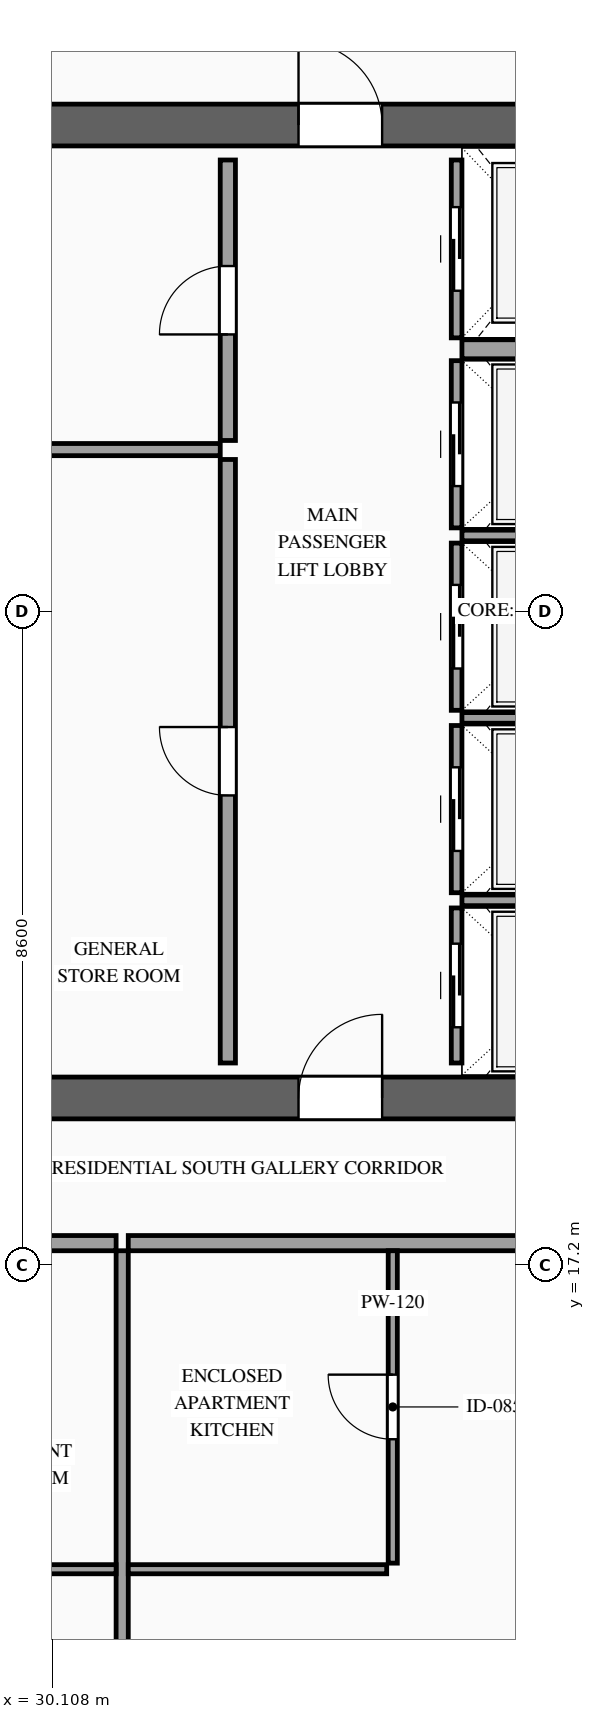
"""IFC4 building model, lengths in metres.
Left out: names, types, materials, properties, quantities, classifications, styles, units other than length and angle.
Written with IfcOpenShell. Run it as: python <this file> out.ifc"""

import sys

from ifc_helpers import new_model, si_unit, direction, frame, frame_2d, origin, place, context, subcontext, project, spatial, rectangle, extrude, source, transform, mapped, element, fill, save


model = new_model("IFC4")
c1 = context("Model", 3, precision=1e-05, world=origin(), true_north=direction((0.0, 1.0)))
c2 = subcontext(c1, "Body", "Model", "MODEL_VIEW")
j1 = project(units=[si_unit("LENGTHUNIT", "METRE"), si_unit("PLANEANGLEUNIT", "RADIAN")], contexts=[c1])
p1 = place(None, origin())
s1 = spatial("IfcSite", under=j1, at=p1, CompositionType="ELEMENT")
p2 = place(p1, origin())
s2 = spatial("IfcBuilding", under=s1, at=p2, CompositionType="ELEMENT")
p3 = place(p2, frame((0.0, 0.0, 241.6)))
s3 = spatial("IfcBuildingStorey", under=s2, at=p3, CompositionType="ELEMENT", Elevation=241.6)
p4 = place(p3, frame((23.525, 19.4, 0.0), z_axis=(0.0, 0.0, 1.0), x_axis=(1.0, 0.0, 0.0)))
e1 = element("IfcWall", 1, at=p4, inside=s3, PredefinedType="SHEAR", context=c2, shape_type="SweptSolid", body=[
    extrude(rectangle(XDim=26.95, YDim=0.55, at=frame_2d((13.475, 0.0))), origin(), (0.0, 0.0, 1.0), 3.5),
])
p5 = place(p4, frame((1.925, 0.0, 0.0)))
e2 = element("IfcOpeningElement", 2, at=p5, cuts=e1, PredefinedType="OPENING", context=c2, shape_type="SweptSolid", body=[
    extrude(rectangle(XDim=1.1, YDim=2.2, at=frame_2d((0.55, 1.1))), frame((0.0, 0.29, 0.0), z_axis=(0.0, -1.0, 0.0), x_axis=(1.0, 0.0, 0.0)), (0.0, 0.0, 1.0), 0.58),
])
p6 = place(p4, frame((9.825, 0.0, 0.0)))
e3 = element("IfcOpeningElement", 3, at=p6, cuts=e1, PredefinedType="OPENING", context=c2, shape_type="SweptSolid", body=[
    extrude(rectangle(XDim=1.1, YDim=2.2, at=frame_2d((0.55, 1.1))), frame((0.0, 0.29, 0.0), z_axis=(0.0, -1.0, 0.0), x_axis=(1.0, 0.0, 0.0)), (0.0, 0.0, 1.0), 0.58),
])
p7 = place(p4, frame((23.025, 0.0, 0.0)))
e4 = element("IfcOpeningElement", 4, at=p7, cuts=e1, PredefinedType="OPENING", context=c2, shape_type="SweptSolid", body=[
    extrude(rectangle(XDim=1.1, YDim=2.2, at=frame_2d((0.55, 1.1))), frame((0.0, 0.29, 0.0), z_axis=(0.0, -1.0, 0.0), x_axis=(1.0, 0.0, 0.0)), (0.0, 0.0, 1.0), 0.58),
])
p8 = place(p4, frame((19.645, 0.0, 0.0)))
e5 = element("IfcOpeningElement", 5, at=p8, cuts=e1, PredefinedType="OPENING", context=c2, shape_type="SweptSolid", body=[
    extrude(rectangle(XDim=0.9, YDim=2.15, at=frame_2d((0.45, 1.075))), frame((0.0, 0.29, 0.0), z_axis=(0.0, -1.0, 0.0), x_axis=(1.0, 0.0, 0.0)), (0.0, 0.0, 1.0), 0.58),
])
p9 = place(p4, frame((18.205, 0.0, 0.0)))
e6 = element("IfcOpeningElement", 6, at=p9, cuts=e1, PredefinedType="OPENING", context=c2, shape_type="SweptSolid", body=[
    extrude(rectangle(XDim=0.9, YDim=2.15, at=frame_2d((0.45, 1.075))), frame((0.0, 0.29, 0.0), z_axis=(0.0, -1.0, 0.0), x_axis=(1.0, 0.0, 0.0)), (0.0, 0.0, 1.0), 0.58),
])
p10 = place(p3, frame((23.525, 32.2, 0.0), z_axis=(0.0, 0.0, 1.0), x_axis=(1.0, 0.0, 0.0)))
e7 = element("IfcWall", 7, at=p10, inside=s3, PredefinedType="SHEAR", context=c2, shape_type="SweptSolid", body=[
    extrude(rectangle(XDim=26.95, YDim=0.55, at=frame_2d((13.475, 0.0))), origin(), (0.0, 0.0, 1.0), 3.5),
])
p11 = place(p10, frame((4.545, 0.0, 0.0)))
e8 = element("IfcOpeningElement", 8, at=p11, cuts=e7, PredefinedType="OPENING", context=c2, shape_type="SweptSolid", body=[
    extrude(rectangle(XDim=0.9, YDim=2.15, at=frame_2d((0.45, 1.075))), frame((0.0, 0.29, 0.0), z_axis=(0.0, -1.0, 0.0), x_axis=(1.0, 0.0, 0.0)), (0.0, 0.0, 1.0), 0.58),
])
p12 = place(p10, frame((9.825, 0.0, 0.0)))
e9 = element("IfcOpeningElement", 9, at=p12, cuts=e7, PredefinedType="OPENING", context=c2, shape_type="SweptSolid", body=[
    extrude(rectangle(XDim=1.1, YDim=2.2, at=frame_2d((0.55, 1.1))), frame((0.0, 0.29, 0.0), z_axis=(0.0, -1.0, 0.0), x_axis=(1.0, 0.0, 0.0)), (0.0, 0.0, 1.0), 0.58),
])
p13 = place(p10, frame((15.675, 0.0, 0.0)))
e10 = element("IfcOpeningElement", 10, at=p13, cuts=e7, PredefinedType="OPENING", context=c2, shape_type="SweptSolid", body=[
    extrude(rectangle(XDim=1.1, YDim=2.2, at=frame_2d((0.55, 1.1))), frame((0.0, 0.29, 0.0), z_axis=(0.0, -1.0, 0.0), x_axis=(1.0, 0.0, 0.0)), (0.0, 0.0, 1.0), 0.58),
])
p14 = place(p10, frame((18.205, 0.0, 0.0)))
e11 = element("IfcOpeningElement", 11, at=p14, cuts=e7, PredefinedType="OPENING", context=c2, shape_type="SweptSolid", body=[
    extrude(rectangle(XDim=0.9, YDim=2.15, at=frame_2d((0.45, 1.075))), frame((0.0, 0.29, 0.0), z_axis=(0.0, -1.0, 0.0), x_axis=(1.0, 0.0, 0.0)), (0.0, 0.0, 1.0), 0.58),
])
p15 = place(p10, frame((19.645, 0.0, 0.0)))
e12 = element("IfcOpeningElement", 12, at=p15, cuts=e7, PredefinedType="OPENING", context=c2, shape_type="SweptSolid", body=[
    extrude(rectangle(XDim=0.9, YDim=2.15, at=frame_2d((0.45, 1.075))), frame((0.0, 0.29, 0.0), z_axis=(0.0, -1.0, 0.0), x_axis=(1.0, 0.0, 0.0)), (0.0, 0.0, 1.0), 0.58),
])
p16 = place(p3, frame((35.43, 19.86, 0.0), z_axis=(0.0, 0.0, 1.0), x_axis=(0.0, 1.0, 0.0)))
e13 = element("IfcWall", 13, at=p16, inside=s3, PredefinedType="SOLIDWALL", context=c2, shape_type="SweptSolid", body=[
    extrude(rectangle(XDim=2.04, YDim=0.14, at=frame_2d((1.02, 0.0))), origin(), (0.0, 0.0, 1.0), 3.28),
])
p17 = place(p16, frame((0.47, 0.0, 0.0)))
e14 = element("IfcOpeningElement", 14, at=p17, cuts=e13, PredefinedType="OPENING", context=c2, shape_type="SweptSolid", body=[
    extrude(rectangle(XDim=1.1, YDim=2.2, at=frame_2d((0.55, 1.1))), frame((0.0, 0.085, 0.0), z_axis=(0.0, -1.0, 0.0), x_axis=(1.0, 0.0, 0.0)), (0.0, 0.0, 1.0), 0.17),
])
m1 = source(origin(), c2, "Body", "SweptSolid", [
    extrude(rectangle(XDim=2.4, YDim=0.14, at=frame_2d((1.2, 0.0))), origin(), (0.0, 0.0, 1.0), 3.28),
])
p18 = place(p3, frame((35.5, 22.0, 0.0), z_axis=(0.0, 0.0, 1.0), x_axis=(1.0, 0.0, 0.0)))
e15 = element("IfcWall", 15, at=p18, inside=s3, PredefinedType="SOLIDWALL", context=c2, shape_type="MappedRepresentation", body=[
    mapped(m1, transform((0.0, 0.0, 0.0), scale=1.0)),
])
p19 = place(p3, frame((35.43, 22.1, 0.0), z_axis=(0.0, 0.0, 1.0), x_axis=(0.0, 1.0, 0.0)))
e16 = element("IfcWall", 16, at=p19, inside=s3, PredefinedType="SOLIDWALL", context=c2, shape_type="SweptSolid", body=[
    extrude(rectangle(XDim=2.2, YDim=0.14, at=frame_2d((1.1, 0.0))), origin(), (0.0, 0.0, 1.0), 3.28),
])
p20 = place(p19, frame((0.55, 0.0, 0.0)))
e17 = element("IfcOpeningElement", 17, at=p20, cuts=e16, PredefinedType="OPENING", context=c2, shape_type="SweptSolid", body=[
    extrude(rectangle(XDim=1.1, YDim=2.2, at=frame_2d((0.55, 1.1))), frame((0.0, 0.085, 0.0), z_axis=(0.0, -1.0, 0.0), x_axis=(1.0, 0.0, 0.0)), (0.0, 0.0, 1.0), 0.17),
])
p21 = place(p3, frame((35.5, 24.4, 0.0), z_axis=(0.0, 0.0, 1.0), x_axis=(1.0, 0.0, 0.0)))
e18 = element("IfcWall", 18, at=p21, inside=s3, PredefinedType="SOLIDWALL", context=c2, shape_type="MappedRepresentation", body=[
    mapped(m1, transform((0.0, 0.0, 0.0), scale=1.0)),
])
p22 = place(p3, frame((35.43, 24.5, 0.0), z_axis=(0.0, 0.0, 1.0), x_axis=(0.0, 1.0, 0.0)))
e19 = element("IfcWall", 19, at=p22, inside=s3, PredefinedType="SOLIDWALL", context=c2, shape_type="SweptSolid", body=[
    extrude(rectangle(XDim=2.2, YDim=0.14, at=frame_2d((1.1, 0.0))), origin(), (0.0, 0.0, 1.0), 3.28),
])
p23 = place(p22, frame((0.55, 0.0, 0.0)))
e20 = element("IfcOpeningElement", 20, at=p23, cuts=e19, PredefinedType="OPENING", context=c2, shape_type="SweptSolid", body=[
    extrude(rectangle(XDim=1.1, YDim=2.2, at=frame_2d((0.55, 1.1))), frame((0.0, 0.085, 0.0), z_axis=(0.0, -1.0, 0.0), x_axis=(1.0, 0.0, 0.0)), (0.0, 0.0, 1.0), 0.17),
])
p24 = place(p3, frame((35.5, 26.8, 0.0), z_axis=(0.0, 0.0, 1.0), x_axis=(1.0, 0.0, 0.0)))
e21 = element("IfcWall", 21, at=p24, inside=s3, PredefinedType="SOLIDWALL", context=c2, shape_type="MappedRepresentation", body=[
    mapped(m1, transform((0.0, 0.0, 0.0), scale=1.0)),
])
p25 = place(p3, frame((35.43, 26.9, 0.0), z_axis=(0.0, 0.0, 1.0), x_axis=(0.0, 1.0, 0.0)))
e22 = element("IfcWall", 22, at=p25, inside=s3, PredefinedType="SOLIDWALL", context=c2, shape_type="SweptSolid", body=[
    extrude(rectangle(XDim=2.2, YDim=0.14, at=frame_2d((1.1, 0.0))), origin(), (0.0, 0.0, 1.0), 3.28),
])
p26 = place(p25, frame((0.55, 0.0, 0.0)))
e23 = element("IfcOpeningElement", 23, at=p26, cuts=e22, PredefinedType="OPENING", context=c2, shape_type="SweptSolid", body=[
    extrude(rectangle(XDim=1.1, YDim=2.2, at=frame_2d((0.55, 1.1))), frame((0.0, 0.085, 0.0), z_axis=(0.0, -1.0, 0.0), x_axis=(1.0, 0.0, 0.0)), (0.0, 0.0, 1.0), 0.17),
])
p27 = place(p3, frame((35.43, 29.4, 0.0), z_axis=(0.0, 0.0, 1.0), x_axis=(0.0, 1.0, 0.0)))
e24 = element("IfcWall", 24, at=p27, inside=s3, PredefinedType="SOLIDWALL", context=c2, shape_type="SweptSolid", body=[
    extrude(rectangle(XDim=2.34, YDim=0.14, at=frame_2d((1.17, 0.0))), origin(), (0.0, 0.0, 1.0), 3.28),
])
p28 = place(p27, frame((0.62, 0.0, 0.0)))
e25 = element("IfcOpeningElement", 25, at=p28, cuts=e24, PredefinedType="OPENING", context=c2, shape_type="SweptSolid", body=[
    extrude(rectangle(XDim=1.1, YDim=2.2, at=frame_2d((0.55, 1.1))), frame((0.0, 0.085, 0.0), z_axis=(0.0, -1.0, 0.0), x_axis=(1.0, 0.0, 0.0)), (0.0, 0.0, 1.0), 0.17),
])
m2 = source(origin(), c2, "Body", "SweptSolid", [
    extrude(rectangle(XDim=2.4, YDim=0.25, at=frame_2d((1.2, 0.0))), origin(), (0.0, 0.0, 1.0), 3.28),
])
p29 = place(p3, frame((35.5, 29.25, 0.0), z_axis=(0.0, 0.0, 1.0), x_axis=(1.0, 0.0, 0.0)))
e26 = element("IfcWall", 26, at=p29, inside=s3, PredefinedType="SOLIDWALL", context=c2, shape_type="MappedRepresentation", body=[
    mapped(m2, transform((0.0, 0.0, 0.0), scale=1.0)),
])
p30 = place(p3, frame((32.42, 19.86, 0.0), z_axis=(0.0, 0.0, 1.0), x_axis=(0.0, 1.0, 0.0)))
e27 = element("IfcWall", 27, at=p30, inside=s3, PredefinedType="PARTITIONING", context=c2, shape_type="SweptSolid", body=[
    extrude(rectangle(XDim=7.94, YDim=0.2, at=frame_2d((3.97, 0.0))), origin(), (0.0, 0.0, 1.0), 3.28),
])
p31 = place(p30, frame((3.52, 0.0, 0.0)))
e28 = element("IfcOpeningElement", 28, at=p31, cuts=e27, PredefinedType="OPENING", context=c2, shape_type="SweptSolid", body=[
    extrude(rectangle(XDim=0.9, YDim=2.15, at=frame_2d((0.45, 1.075))), frame((0.0, 0.115, 0.0), z_axis=(0.0, -1.0, 0.0), x_axis=(1.0, 0.0, 0.0)), (0.0, 0.0, 1.0), 0.23),
])
p32 = place(p3, frame((32.42, 28.05, 0.0), z_axis=(0.0, 0.0, 1.0), x_axis=(0.0, 1.0, 0.0)))
e29 = element("IfcWall", 29, at=p32, inside=s3, PredefinedType="PARTITIONING", context=c2, shape_type="SweptSolid", body=[
    extrude(rectangle(XDim=3.69, YDim=0.2, at=frame_2d((1.845, 0.0))), origin(), (0.0, 0.0, 1.0), 3.28),
])
p33 = place(p32, frame((1.395, 0.0, 0.0)))
e30 = element("IfcOpeningElement", 30, at=p33, cuts=e29, PredefinedType="OPENING", context=c2, shape_type="SweptSolid", body=[
    extrude(rectangle(XDim=0.9, YDim=2.15, at=frame_2d((0.45, 1.075))), frame((0.0, 0.115, 0.0), z_axis=(0.0, -1.0, 0.0), x_axis=(1.0, 0.0, 0.0)), (0.0, 0.0, 1.0), 0.23),
])
m3 = source(origin(), c2, "Body", "SweptSolid", [
    extrude(rectangle(XDim=2.47, YDim=0.16, at=frame_2d((1.235, 0.0))), origin(), (0.0, 0.0, 1.0), 3.28),
])
p34 = place(p3, frame((29.85, 27.93, 0.0), z_axis=(0.0, 0.0, 1.0), x_axis=(1.0, 0.0, 0.0)))
e31 = element("IfcWall", 31, at=p34, inside=s3, PredefinedType="PARTITIONING", context=c2, shape_type="MappedRepresentation", body=[
    mapped(m3, transform((0.0, 0.0, 0.0), scale=1.0)),
])
p35 = place(p3, frame((19.44, 17.49, 0.0), z_axis=(0.0, 0.0, 1.0), x_axis=(1.0, 0.0, 0.0)))
e32 = element("IfcWall", 32, at=p35, inside=s3, PredefinedType="PARTITIONING", context=c2, shape_type="SweptSolid", body=[
    extrude(rectangle(XDim=11.51, YDim=0.2, at=frame_2d((5.755, 0.0))), origin(), (0.0, 0.0, 1.0), 3.28),
])
p36 = place(p35, frame((5.355, 0.0, 0.0)))
e33 = element("IfcOpeningElement", 33, at=p36, cuts=e32, PredefinedType="OPENING", context=c2, shape_type="SweptSolid", body=[
    extrude(rectangle(XDim=1.0, YDim=2.2, at=frame_2d((0.5, 1.1))), frame((0.0, 0.115, 0.0), z_axis=(0.0, -1.0, 0.0), x_axis=(1.0, 0.0, 0.0)), (0.0, 0.0, 1.0), 0.23),
])
m4 = source(origin(), c2, "Body", "SweptSolid", [
    extrude(rectangle(XDim=12.04, YDim=0.16, at=frame_2d((6.02, 0.0))), origin(), (0.0, 0.0, 1.0), 3.28),
])
p37 = place(p3, frame((31.03, 5.35, 0.0), z_axis=(0.0, 0.0, 1.0), x_axis=(0.0, 1.0, 0.0)))
e34 = element("IfcWall", 34, at=p37, inside=s3, PredefinedType="PARTITIONING", context=c2, shape_type="MappedRepresentation", body=[
    mapped(m4, transform((0.0, 0.0, 0.0), scale=1.0)),
])
m5 = source(origin(), c2, "Body", "SweptSolid", [
    extrude(rectangle(XDim=3.2, YDim=0.12, at=frame_2d((1.6, 0.0))), origin(), (0.0, 0.0, 1.0), 3.28),
])
p38 = place(p3, frame((27.75, 13.2, 0.0), z_axis=(0.0, 0.0, 1.0), x_axis=(1.0, 0.0, 0.0)))
e35 = element("IfcWall", 35, at=p38, inside=s3, PredefinedType="PARTITIONING", context=c2, shape_type="MappedRepresentation", body=[
    mapped(m5, transform((0.0, 0.0, 0.0), scale=1.0)),
])
p39 = place(p3, frame((31.11, 17.49, 0.0), z_axis=(0.0, 0.0, 1.0), x_axis=(1.0, 0.0, 0.0)))
e36 = element("IfcWall", 36, at=p39, inside=s3, PredefinedType="PARTITIONING", context=c2, shape_type="SweptSolid", body=[
    extrude(rectangle(XDim=11.429, YDim=0.2, at=frame_2d((5.714, 0.0))), origin(), (0.0, 0.0, 1.0), 3.28),
])
p40 = place(p39, frame((5.314, 0.0, 0.0)))
e37 = element("IfcOpeningElement", 37, at=p40, cuts=e36, PredefinedType="OPENING", context=c2, shape_type="SweptSolid", body=[
    extrude(rectangle(XDim=1.0, YDim=2.2, at=frame_2d((0.5, 1.1))), frame((0.0, 0.115, 0.0), z_axis=(0.0, -1.0, 0.0), x_axis=(1.0, 0.0, 0.0)), (0.0, 0.0, 1.0), 0.23),
])
m6 = source(origin(), c2, "Body", "SweptSolid", [
    extrude(rectangle(XDim=3.4, YDim=0.12, at=frame_2d((1.7, 0.0))), origin(), (0.0, 0.0, 1.0), 3.28),
])
p41 = place(p3, frame((31.11, 13.2, 0.0), z_axis=(0.0, 0.0, 1.0), x_axis=(1.0, 0.0, 0.0)))
e38 = element("IfcWall", 38, at=p41, inside=s3, PredefinedType="PARTITIONING", context=c2, shape_type="MappedRepresentation", body=[
    mapped(m6, transform((0.0, 0.0, 0.0), scale=1.0)),
])
p42 = place(p3, frame((34.59, 13.28, 0.0), z_axis=(0.0, 0.0, 1.0), x_axis=(0.0, 1.0, 0.0)))
e39 = element("IfcWall", 39, at=p42, inside=s3, PredefinedType="PARTITIONING", context=c2, shape_type="SweptSolid", body=[
    extrude(rectangle(XDim=4.11, YDim=0.12, at=frame_2d((2.055, 0.0))), origin(), (0.0, 0.0, 1.0), 3.28),
])
p43 = place(p42, frame((1.63, 0.0, 0.0)))
e40 = element("IfcOpeningElement", 40, at=p43, cuts=e39, PredefinedType="OPENING", context=c2, shape_type="SweptSolid", body=[
    extrude(rectangle(XDim=0.85, YDim=2.1, at=frame_2d((0.425, 1.05))), frame((0.0, 0.075, 0.0), z_axis=(0.0, -1.0, 0.0), x_axis=(1.0, 0.0, 0.0)), (0.0, 0.0, 1.0), 0.15),
])
m7 = source(origin(), c2, "Body", "SweptSolid", [
    extrude(rectangle(XDim=1.1, YDim=2.2, at=frame_2d((0.55, 1.1))), frame((0.0, 0.025, 0.0), z_axis=(0.0, -1.0, 0.0), x_axis=(1.0, 0.0, 0.0)), (0.0, 0.0, 1.0), 0.05),
])
p44 = place(p17, origin())
e41 = element("IfcDoor", 41, at=p44, inside=s3, OperationType="SLIDING_TO_RIGHT", PredefinedType="DOOR", context=c2, shape_type="MappedRepresentation", body=[
    mapped(m7, transform((0.0, 0.0, 0.0), scale=1.0)),
])
fill(e14, e41)
p45 = place(p20, origin())
e42 = element("IfcDoor", 42, at=p45, inside=s3, OperationType="SLIDING_TO_LEFT", PredefinedType="DOOR", context=c2, shape_type="MappedRepresentation", body=[
    mapped(m7, transform((0.0, 0.0, 0.0), scale=1.0)),
])
fill(e17, e42)
p46 = place(p23, origin())
e43 = element("IfcDoor", 43, at=p46, inside=s3, OperationType="SLIDING_TO_RIGHT", PredefinedType="DOOR", context=c2, shape_type="MappedRepresentation", body=[
    mapped(m7, transform((0.0, 0.0, 0.0), scale=1.0)),
])
fill(e20, e43)
p47 = place(p26, origin())
e44 = element("IfcDoor", 44, at=p47, inside=s3, OperationType="SLIDING_TO_LEFT", PredefinedType="DOOR", context=c2, shape_type="MappedRepresentation", body=[
    mapped(m7, transform((0.0, 0.0, 0.0), scale=1.0)),
])
fill(e23, e44)
p48 = place(p28, origin())
e45 = element("IfcDoor", 45, at=p48, inside=s3, OperationType="SLIDING_TO_RIGHT", PredefinedType="DOOR", context=c2, shape_type="MappedRepresentation", body=[
    mapped(m7, transform((0.0, 0.0, 0.0), scale=1.0)),
])
fill(e25, e45)
m8 = source(origin(), c2, "Body", "SweptSolid", [
    extrude(rectangle(XDim=1.1, YDim=2.2, at=frame_2d((0.55, 1.1))), frame((0.0, 0.025, 0.0), z_axis=(0.0, -1.0, 0.0), x_axis=(1.0, 0.0, 0.0)), (0.0, 0.0, 1.0), 0.05),
])
p49 = place(p6, origin())
e46 = element("IfcDoor", 46, at=p49, inside=s3, OperationType="SINGLE_SWING_RIGHT", PredefinedType="DOOR", context=c2, shape_type="MappedRepresentation", body=[
    mapped(m8, transform((0.0, 0.0, 0.0), scale=1.0)),
])
fill(e3, e46)
p50 = place(p12, origin())
e47 = element("IfcDoor", 47, at=p50, inside=s3, OperationType="SINGLE_SWING_LEFT", PredefinedType="DOOR", context=c2, shape_type="MappedRepresentation", body=[
    mapped(m8, transform((0.0, 0.0, 0.0), scale=1.0)),
])
fill(e9, e47)
m9 = source(origin(), c2, "Body", "SweptSolid", [
    extrude(rectangle(XDim=0.9, YDim=2.15, at=frame_2d((0.45, 1.075))), frame((0.0, 0.025, 0.0), z_axis=(0.0, -1.0, 0.0), x_axis=(1.0, 0.0, 0.0)), (0.0, 0.0, 1.0), 0.05),
])
p51 = place(p31, origin())
e48 = element("IfcDoor", 48, at=p51, inside=s3, OperationType="SINGLE_SWING_RIGHT", PredefinedType="DOOR", context=c2, shape_type="MappedRepresentation", body=[
    mapped(m9, transform((0.0, 0.0, 0.0), scale=1.0)),
])
fill(e28, e48)
p52 = place(p33, origin())
e49 = element("IfcDoor", 49, at=p52, inside=s3, OperationType="SINGLE_SWING_LEFT", PredefinedType="DOOR", context=c2, shape_type="MappedRepresentation", body=[
    mapped(m9, transform((0.0, 0.0, 0.0), scale=1.0)),
])
fill(e30, e49)
m10 = source(origin(), c2, "Body", "SweptSolid", [
    extrude(rectangle(XDim=0.85, YDim=2.1, at=frame_2d((0.425, 1.05))), frame((0.0, 0.025, 0.0), z_axis=(0.0, -1.0, 0.0), x_axis=(1.0, 0.0, 0.0)), (0.0, 0.0, 1.0), 0.05),
])
p53 = place(p43, origin())
e50 = element("IfcDoor", 50, at=p53, inside=s3, OperationType="SINGLE_SWING_RIGHT", PredefinedType="DOOR", context=c2, shape_type="MappedRepresentation", body=[
    mapped(m10, transform((0.0, 0.0, 0.0), scale=1.0)),
])
fill(e40, e50)
save(model, sys.argv[1])
